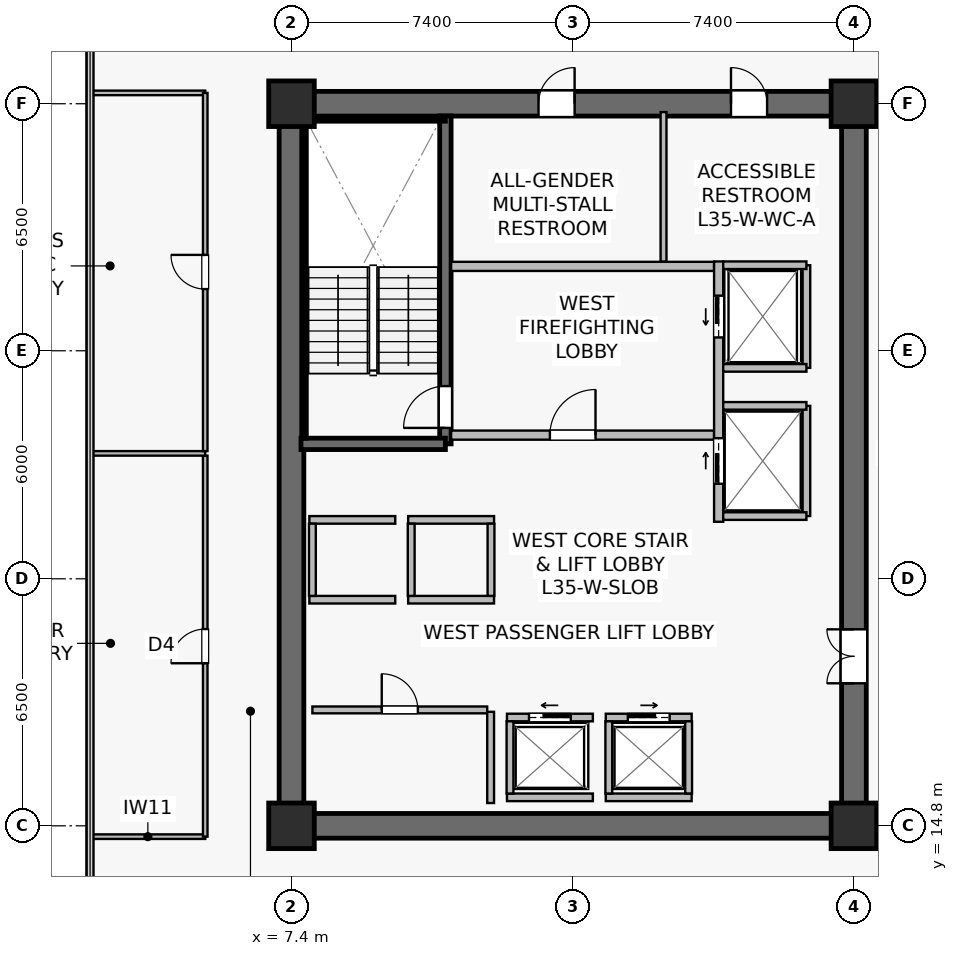
"""IFC4 building model, lengths in metres.
Left out: names, types, materials, properties, quantities, classifications, styles, units other than length and angle.
Written with IfcOpenShell. Run it as: python <this file> out.ifc"""

import sys

from ifc_helpers import new_model, si_unit, direction, frame, frame_2d, origin, origin_2d, place, context, subcontext, project, spatial, rectangle, extrude, source, transform, mapped, element, fill, save


model = new_model("IFC4")
c1 = context("Model", 3, precision=1e-05, world=origin(), true_north=direction((0.0, 1.0)))
c2 = subcontext(c1, "Body", "Model", "MODEL_VIEW")
j1 = project(units=[si_unit("LENGTHUNIT", "METRE"), si_unit("PLANEANGLEUNIT", "RADIAN")], contexts=[c1])
p1 = place(None, origin())
s1 = spatial("IfcSite", under=j1, at=p1, CompositionType="ELEMENT")
p2 = place(p1, origin())
s2 = spatial("IfcBuilding", under=s1, at=p2, CompositionType="ELEMENT")
p3 = place(p2, frame((0.0, 0.0, 146.1)))
s3 = spatial("IfcBuildingStorey", under=s2, at=p3, CompositionType="ELEMENT", Elevation=146.1)
p4 = place(p3, frame((7.075, 14.8, 0.0), z_axis=(0.0, 0.0, 1.0), x_axis=(1.0, 0.0, 0.0)))
e1 = element("IfcWall", 1, at=p4, inside=s3, PredefinedType="SHEAR", context=c2, shape_type="SweptSolid", body=[
    extrude(rectangle(XDim=15.45, YDim=0.65, at=frame_2d((7.725, 0.0))), origin(), (0.0, 0.0, 1.0), 3.79),
])
p5 = place(p3, frame((7.075, 33.8, 0.0), z_axis=(0.0, 0.0, 1.0), x_axis=(1.0, 0.0, 0.0)))
e2 = element("IfcWall", 2, at=p5, inside=s3, PredefinedType="SHEAR", context=c2, shape_type="SweptSolid", body=[
    extrude(rectangle(XDim=15.45, YDim=0.65, at=frame_2d((7.725, 0.0))), origin(), (0.0, 0.0, 1.0), 3.79),
])
p6 = place(p5, frame((6.825, 0.0, 0.0)))
e3 = element("IfcOpeningElement", 3, at=p6, cuts=e2, PredefinedType="OPENING", context=c2, shape_type="SweptSolid", body=[
    extrude(rectangle(XDim=0.95, YDim=2.15, at=frame_2d((0.475, 1.075))), frame((0.0, 0.335, 0.0), z_axis=(0.0, -1.0, 0.0), x_axis=(1.0, 0.0, 0.0)), (0.0, 0.0, 1.0), 0.67),
])
p7 = place(p5, frame((11.89, 0.0, 0.0)))
e4 = element("IfcOpeningElement", 4, at=p7, cuts=e2, PredefinedType="OPENING", context=c2, shape_type="SweptSolid", body=[
    extrude(rectangle(XDim=0.95, YDim=2.15, at=frame_2d((0.475, 1.075))), frame((0.0, 0.335, 0.0), z_axis=(0.0, -1.0, 0.0), x_axis=(1.0, 0.0, 0.0)), (0.0, 0.0, 1.0), 0.67),
])
p8 = place(p3, frame((7.4, 15.125, 0.0), z_axis=(0.0, 0.0, 1.0), x_axis=(0.0, 1.0, 0.0)))
e5 = element("IfcWall", 5, at=p8, inside=s3, PredefinedType="SHEAR", context=c2, shape_type="SweptSolid", body=[
    extrude(rectangle(XDim=18.35, YDim=0.65, at=frame_2d((9.175, 0.0))), origin(), (0.0, 0.0, 1.0), 3.79),
])
p9 = place(p3, frame((22.2, 15.125, 0.0), z_axis=(0.0, 0.0, 1.0), x_axis=(0.0, 1.0, 0.0)))
e6 = element("IfcWall", 6, at=p9, inside=s3, PredefinedType="SHEAR", context=c2, shape_type="SweptSolid", body=[
    extrude(rectangle(XDim=18.35, YDim=0.65, at=frame_2d((9.175, 0.0))), origin(), (0.0, 0.0, 1.0), 3.79),
])
p10 = place(p9, frame((3.425, 0.0, 0.0)))
e7 = element("IfcOpeningElement", 7, at=p10, cuts=e6, PredefinedType="OPENING", context=c2, shape_type="SweptSolid", body=[
    extrude(rectangle(XDim=1.42, YDim=2.2, at=frame_2d((0.71, 1.1))), frame((0.0, 0.335, 0.0), z_axis=(0.0, -1.0, 0.0), x_axis=(1.0, 0.0, 0.0)), (0.0, 0.0, 1.0), 0.67),
])
p11 = place(p3, frame((11.45, 24.85, 0.0), z_axis=(0.0, 0.0, 1.0), x_axis=(0.0, 1.0, 0.0)))
e8 = element("IfcWall", 8, at=p11, inside=s3, PredefinedType="SHEAR", context=c2, shape_type="SweptSolid", body=[
    extrude(rectangle(XDim=8.63, YDim=0.3, at=frame_2d((4.315, 0.0))), origin(), (0.0, 0.0, 1.0), 3.79),
])
p12 = place(p11, frame((0.42, 0.0, 0.0)))
e9 = element("IfcOpeningElement", 9, at=p12, cuts=e8, PredefinedType="OPENING", context=c2, shape_type="SweptSolid", body=[
    extrude(rectangle(XDim=1.1, YDim=2.15, at=frame_2d((0.55, 1.075))), frame((0.0, 0.16, 0.0), z_axis=(0.0, -1.0, 0.0), x_axis=(1.0, 0.0, 0.0)), (0.0, 0.0, 1.0), 0.32),
])
p13 = place(p3, frame((7.65, 24.85, 0.0), z_axis=(0.0, 0.0, 1.0), x_axis=(1.0, 0.0, 0.0)))
e10 = element("IfcWall", 10, at=p13, inside=s3, PredefinedType="SHEAR", context=c2, shape_type="SweptSolid", body=[
    extrude(rectangle(XDim=3.8, YDim=0.3, at=frame_2d((1.9, 0.0))), origin(), (0.0, 0.0, 1.0), 3.79),
])
p14 = place(p3, frame((7.73, 33.4, 0.0), z_axis=(0.0, 0.0, 1.0), x_axis=(1.0, 0.0, 0.0)))
e11 = element("IfcWall", 11, at=p14, inside=s3, PredefinedType="SOLIDWALL", context=c2, shape_type="SweptSolid", body=[
    extrude(rectangle(XDim=3.72, YDim=0.12, at=frame_2d((1.86, 0.0))), origin(), (0.0, 0.0, 1.0), 3.79),
])
p15 = place(p3, frame((7.73, 25.0, 0.0), z_axis=(0.0, 0.0, 1.0), x_axis=(0.0, 1.0, 0.0)))
e12 = element("IfcWall", 12, at=p15, inside=s3, PredefinedType="SOLIDWALL", context=c2, shape_type="SweptSolid", body=[
    extrude(rectangle(XDim=8.32, YDim=0.12, at=frame_2d((4.16, 0.0))), origin(), (0.0, 0.0, 1.0), 3.79),
])
m1 = source(origin(), c2, "Body", "SweptSolid", [
    extrude(rectangle(XDim=1.2, YDim=1.2, at=origin_2d()), origin(), (0.0, 0.0, 1.0), 4.1),
])
for number, where, z_axis, x_axis in (
    (13, (7.4, 14.8, 0.0), (0.0, 0.0, 1.0), (1.0, 0.0, 0.0)),
    (14, (22.2, 14.8, 0.0), (0.0, 0.0, 1.0), (1.0, 0.0, 0.0)),
    (15, (7.4, 33.8, 0.0), (0.0, 0.0, 1.0), (1.0, 0.0, 0.0)),
    (16, (22.2, 33.8, 0.0), (0.0, 0.0, 1.0), (1.0, 0.0, 0.0)),
):
    element("IfcColumn", number, at=place(p3, frame(where, z_axis=z_axis, x_axis=x_axis)), inside=s3, PredefinedType="COLUMN", context=c2, shape_type="MappedRepresentation", body=[
        mapped(m1, transform((0.0, 0.0, 0.0), scale=1.0)),
    ])
p16 = place(p3, frame((11.6, 25.08, 0.0), z_axis=(0.0, 0.0, 1.0), x_axis=(1.0, 0.0, 0.0)))
e17 = element("IfcWall", 17, at=p16, inside=s3, PredefinedType="SOLIDWALL", context=c2, shape_type="SweptSolid", body=[
    extrude(rectangle(XDim=6.92, YDim=0.24, at=frame_2d((3.46, 0.0))), origin(), (0.0, 0.0, 1.0), 3.125),
])
p17 = place(p16, frame((2.6, 0.0, 0.0)))
e18 = element("IfcOpeningElement", 18, at=p17, cuts=e17, PredefinedType="OPENING", context=c2, shape_type="SweptSolid", body=[
    extrude(rectangle(XDim=1.2, YDim=2.16, at=frame_2d((0.6, 1.08))), frame((0.0, 0.13, 0.0), z_axis=(0.0, -1.0, 0.0), x_axis=(1.0, 0.0, 0.0)), (0.0, 0.0, 1.0), 0.26),
])
p18 = place(p3, frame((11.6, 29.52, 0.0), z_axis=(0.0, 0.0, 1.0), x_axis=(1.0, 0.0, 0.0)))
e19 = element("IfcWall", 19, at=p18, inside=s3, PredefinedType="SOLIDWALL", context=c2, shape_type="SweptSolid", body=[
    extrude(rectangle(XDim=6.92, YDim=0.24, at=frame_2d((3.46, 0.0))), origin(), (0.0, 0.0, 1.0), 3.125),
])
p19 = place(p3, frame((18.64, 22.8, 0.0), z_axis=(0.0, 0.0, 1.0), x_axis=(0.0, 1.0, 0.0)))
e20 = element("IfcWall", 20, at=p19, inside=s3, PredefinedType="SOLIDWALL", context=c2, shape_type="SweptSolid", body=[
    extrude(rectangle(XDim=6.85, YDim=0.24, at=frame_2d((3.425, 0.0))), origin(), (0.0, 0.0, 1.0), 2.875),
])
p20 = place(p19, frame((4.85, 0.0, 0.0)))
e21 = element("IfcOpeningElement", 21, at=p20, cuts=e20, PredefinedType="OPENING", context=c2, shape_type="SweptSolid", body=[
    extrude(rectangle(XDim=1.1, YDim=2.22, at=frame_2d((0.55, 1.11))), frame((0.0, 0.13, 0.0), z_axis=(0.0, -1.0, 0.0), x_axis=(1.0, 0.0, 0.0)), (0.0, 0.0, 1.0), 0.26),
])
p21 = place(p19, frame((1.0, 0.0, 0.0)))
e22 = element("IfcOpeningElement", 22, at=p21, cuts=e20, PredefinedType="OPENING", context=c2, shape_type="SweptSolid", body=[
    extrude(rectangle(XDim=1.2, YDim=2.22, at=frame_2d((0.6, 1.11))), frame((0.0, 0.13, 0.0), z_axis=(0.0, -1.0, 0.0), x_axis=(1.0, 0.0, 0.0)), (0.0, 0.0, 1.0), 0.26),
])
p22 = place(p3, frame((13.07, 17.65, 0.0), z_axis=(0.0, 0.0, 1.0), x_axis=(1.0, 0.0, 0.0)))
e23 = element("IfcWall", 23, at=p22, inside=s3, PredefinedType="SOLIDWALL", context=c2, shape_type="SweptSolid", body=[
    extrude(rectangle(XDim=2.26, YDim=0.2, at=frame_2d((1.13, 0.0))), origin(), (0.0, 0.0, 1.0), 3.125),
])
p23 = place(p22, frame((0.58, 0.0, 0.0)))
e24 = element("IfcOpeningElement", 24, at=p23, cuts=e23, PredefinedType="OPENING", context=c2, shape_type="SweptSolid", body=[
    extrude(rectangle(XDim=1.1, YDim=2.22, at=frame_2d((0.55, 1.11))), frame((0.0, 0.11, 0.0), z_axis=(0.0, -1.0, 0.0), x_axis=(1.0, 0.0, 0.0)), (0.0, 0.0, 1.0), 0.22),
])
p24 = place(p3, frame((13.07, 15.55, 0.0), z_axis=(0.0, 0.0, 1.0), x_axis=(1.0, 0.0, 0.0)))
e25 = element("IfcWall", 25, at=p24, inside=s3, PredefinedType="SOLIDWALL", context=c2, shape_type="SweptSolid", body=[
    extrude(rectangle(XDim=2.26, YDim=0.2, at=frame_2d((1.13, 0.0))), origin(), (0.0, 0.0, 1.0), 3.125),
])
p25 = place(p3, frame((13.15, 15.65, 0.0), z_axis=(0.0, 0.0, 1.0), x_axis=(0.0, 1.0, 0.0)))
e26 = element("IfcWall", 26, at=p25, inside=s3, PredefinedType="SOLIDWALL", context=c2, shape_type="SweptSolid", body=[
    extrude(rectangle(XDim=1.9, YDim=0.18, at=frame_2d((0.95, 0.0))), origin(), (0.0, 0.0, 1.0), 3.79),
])
p26 = place(p3, frame((15.67, 17.65, 0.0), z_axis=(0.0, 0.0, 1.0), x_axis=(1.0, 0.0, 0.0)))
e27 = element("IfcWall", 27, at=p26, inside=s3, PredefinedType="SOLIDWALL", context=c2, shape_type="SweptSolid", body=[
    extrude(rectangle(XDim=2.26, YDim=0.2, at=frame_2d((1.13, 0.0))), origin(), (0.0, 0.0, 1.0), 3.79),
])
p27 = place(p26, frame((0.58, 0.0, 0.0)))
e28 = element("IfcOpeningElement", 28, at=p27, cuts=e27, PredefinedType="OPENING", context=c2, shape_type="SweptSolid", body=[
    extrude(rectangle(XDim=1.1, YDim=2.22, at=frame_2d((0.55, 1.11))), frame((0.0, 0.11, 0.0), z_axis=(0.0, -1.0, 0.0), x_axis=(1.0, 0.0, 0.0)), (0.0, 0.0, 1.0), 0.22),
])
p28 = place(p3, frame((15.67, 15.55, 0.0), z_axis=(0.0, 0.0, 1.0), x_axis=(1.0, 0.0, 0.0)))
e29 = element("IfcWall", 29, at=p28, inside=s3, PredefinedType="SOLIDWALL", context=c2, shape_type="SweptSolid", body=[
    extrude(rectangle(XDim=2.26, YDim=0.2, at=frame_2d((1.13, 0.0))), origin(), (0.0, 0.0, 1.0), 3.79),
])
for number, where, z_axis, x_axis in (
    (30, (15.75, 15.65, 0.0), (0.0, 0.0, 1.0), (0.0, 1.0, 0.0)),
    (31, (17.85, 15.65, 0.0), (0.0, 0.0, 1.0), (0.0, 1.0, 0.0)),
):
    element("IfcWall", number, at=place(p3, frame(where, z_axis=z_axis, x_axis=x_axis)), inside=s3, PredefinedType="SOLIDWALL", context=c2, shape_type="SweptSolid", body=[
        extrude(rectangle(XDim=1.9, YDim=0.18, at=frame_2d((0.95, 0.0))), origin(), (0.0, 0.0, 1.0), 3.79),
    ])
for number, where, z_axis, x_axis in (
    (32, (7.87, 20.75, 0.0), (0.0, 0.0, 1.0), (1.0, 0.0, 0.0)),
    (33, (7.87, 22.85, 0.0), (0.0, 0.0, 1.0), (1.0, 0.0, 0.0)),
):
    element("IfcWall", number, at=place(p3, frame(where, z_axis=z_axis, x_axis=x_axis)), inside=s3, PredefinedType="SOLIDWALL", context=c2, shape_type="SweptSolid", body=[
        extrude(rectangle(XDim=2.26, YDim=0.2, at=frame_2d((1.13, 0.0))), origin(), (0.0, 0.0, 1.0), 3.79),
    ])
p29 = place(p3, frame((7.95, 20.85, 0.0), z_axis=(0.0, 0.0, 1.0), x_axis=(0.0, 1.0, 0.0)))
e34 = element("IfcWall", 34, at=p29, inside=s3, PredefinedType="SOLIDWALL", context=c2, shape_type="SweptSolid", body=[
    extrude(rectangle(XDim=1.9, YDim=0.18, at=frame_2d((0.95, 0.0))), origin(), (0.0, 0.0, 1.0), 3.79),
])
for number, where, z_axis, x_axis in (
    (35, (10.47, 20.75, 0.0), (0.0, 0.0, 1.0), (1.0, 0.0, 0.0)),
    (36, (10.47, 22.85, 0.0), (0.0, 0.0, 1.0), (1.0, 0.0, 0.0)),
):
    element("IfcWall", number, at=place(p3, frame(where, z_axis=z_axis, x_axis=x_axis)), inside=s3, PredefinedType="SOLIDWALL", context=c2, shape_type="SweptSolid", body=[
        extrude(rectangle(XDim=2.26, YDim=0.2, at=frame_2d((1.13, 0.0))), origin(), (0.0, 0.0, 1.0), 3.79),
    ])
for number, where, z_axis, x_axis in (
    (37, (10.55, 20.85, 0.0), (0.0, 0.0, 1.0), (0.0, 1.0, 0.0)),
    (38, (12.65, 20.85, 0.0), (0.0, 0.0, 1.0), (0.0, 1.0, 0.0)),
):
    element("IfcWall", number, at=place(p3, frame(where, z_axis=z_axis, x_axis=x_axis)), inside=s3, PredefinedType="SOLIDWALL", context=c2, shape_type="SweptSolid", body=[
        extrude(rectangle(XDim=1.9, YDim=0.18, at=frame_2d((0.95, 0.0))), origin(), (0.0, 0.0, 1.0), 3.79),
    ])
p30 = place(p3, frame((20.95, 26.85, 0.0), z_axis=(0.0, 0.0, 1.0), x_axis=(0.0, 1.0, 0.0)))
e39 = element("IfcWall", 39, at=p30, inside=s3, PredefinedType="SOLIDWALL", context=c2, shape_type="SweptSolid", body=[
    extrude(rectangle(XDim=2.7, YDim=0.2, at=frame_2d((1.35, 0.0))), origin(), (0.0, 0.0, 1.0), 3.79),
])
p31 = place(p3, frame((18.76, 29.55, 0.0), z_axis=(0.0, 0.0, 1.0), x_axis=(1.0, 0.0, 0.0)))
e40 = element("IfcWall", 40, at=p31, inside=s3, PredefinedType="SOLIDWALL", context=c2, shape_type="SweptSolid", body=[
    extrude(rectangle(XDim=2.19, YDim=0.2, at=frame_2d((1.095, 0.0))), origin(), (0.0, 0.0, 1.0), 3.79),
])
p32 = place(p3, frame((18.76, 26.85, 0.0), z_axis=(0.0, 0.0, 1.0), x_axis=(1.0, 0.0, 0.0)))
e41 = element("IfcWall", 41, at=p32, inside=s3, PredefinedType="SOLIDWALL", context=c2, shape_type="SweptSolid", body=[
    extrude(rectangle(XDim=2.19, YDim=0.2, at=frame_2d((1.095, 0.0))), origin(), (0.0, 0.0, 1.0), 3.187),
])
p33 = place(p3, frame((20.95, 22.95, 0.0), z_axis=(0.0, 0.0, 1.0), x_axis=(0.0, 1.0, 0.0)))
e42 = element("IfcWall", 42, at=p33, inside=s3, PredefinedType="SOLIDWALL", context=c2, shape_type="SweptSolid", body=[
    extrude(rectangle(XDim=2.9, YDim=0.2, at=frame_2d((1.45, 0.0))), origin(), (0.0, 0.0, 1.0), 2.875),
])
for number, where, z_axis, x_axis in (
    (43, (18.76, 25.85, 0.0), (0.0, 0.0, 1.0), (1.0, 0.0, 0.0)),
    (44, (18.76, 22.95, 0.0), (0.0, 0.0, 1.0), (1.0, 0.0, 0.0)),
):
    element("IfcWall", number, at=place(p3, frame(where, z_axis=z_axis, x_axis=x_axis)), inside=s3, PredefinedType="SOLIDWALL", context=c2, shape_type="SweptSolid", body=[
        extrude(rectangle(XDim=2.19, YDim=0.2, at=frame_2d((1.095, 0.0))), origin(), (0.0, 0.0, 1.0), 3.79),
    ])
p34 = place(p3, frame((7.95, 17.85, 0.0), z_axis=(0.0, 0.0, 1.0), x_axis=(1.0, 0.0, 0.0)))
e45 = element("IfcWall", 45, at=p34, inside=s3, PredefinedType="SOLIDWALL", context=c2, shape_type="SweptSolid", body=[
    extrude(rectangle(XDim=4.6, YDim=0.18, at=frame_2d((2.3, 0.0))), origin(), (0.0, 0.0, 1.0), 3.79),
])
p35 = place(p34, frame((1.825, 0.0, 0.0)))
e46 = element("IfcOpeningElement", 46, at=p35, cuts=e45, PredefinedType="OPENING", context=c2, shape_type="SweptSolid", body=[
    extrude(rectangle(XDim=0.95, YDim=2.15, at=frame_2d((0.475, 1.075))), frame((0.0, 0.1, 0.0), z_axis=(0.0, -1.0, 0.0), x_axis=(1.0, 0.0, 0.0)), (0.0, 0.0, 1.0), 0.2),
])
p36 = place(p3, frame((12.64, 15.4, 0.0), z_axis=(0.0, 0.0, 1.0), x_axis=(0.0, 1.0, 0.0)))
e47 = element("IfcWall", 47, at=p36, inside=s3, PredefinedType="SOLIDWALL", context=c2, shape_type="SweptSolid", body=[
    extrude(rectangle(XDim=2.4, YDim=0.18, at=frame_2d((1.2, 0.0))), origin(), (0.0, 0.0, 1.0), 3.79),
])
p37 = place(p3, frame((17.19, 29.65, 0.0), z_axis=(0.0, 0.0, 1.0), x_axis=(0.0, 1.0, 0.0)))
e48 = element("IfcWall", 48, at=p37, inside=s3, PredefinedType="PLUMBINGWALL", context=c2, shape_type="SweptSolid", body=[
    extrude(rectangle(XDim=3.93, YDim=0.155, at=frame_2d((1.965, 0.0))), origin(), (0.0, 0.0, 1.0), 3.79),
])
for number, where, z_axis, x_axis in (
    (49, (2.11, 14.515, 0.0), (0.0, 0.0, 1.0), (1.0, 0.0, 0.0)),
    (50, (2.11, 34.085, 0.0), (0.0, 0.0, 1.0), (1.0, 0.0, 0.0)),
):
    element("IfcWall", number, at=place(p3, frame(where, z_axis=z_axis, x_axis=x_axis)), inside=s3, PredefinedType="PARTITIONING", context=c2, shape_type="SweptSolid", body=[
        extrude(rectangle(XDim=3.02, YDim=0.12, at=frame_2d((1.51, 0.0))), origin(), (0.0, 0.0, 1.0), 3.79),
    ])
p38 = place(p3, frame((5.13, 14.515, 0.0), z_axis=(0.0, 0.0, 1.0), x_axis=(0.0, 1.0, 0.0)))
e51 = element("IfcWall", 51, at=p38, inside=s3, PredefinedType="PARTITIONING", context=c2, shape_type="SweptSolid", body=[
    extrude(rectangle(XDim=10.025, YDim=0.12, at=frame_2d((5.013, 0.0))), origin(), (0.0, 0.0, 1.0), 3.79),
])
p39 = place(p38, frame((4.562, 0.0, 0.0)))
e52 = element("IfcOpeningElement", 52, at=p39, cuts=e51, PredefinedType="OPENING", context=c2, shape_type="SweptSolid", body=[
    extrude(rectangle(XDim=0.9, YDim=2.1, at=frame_2d((0.45, 1.05))), frame((0.0, 0.07, 0.0), z_axis=(0.0, -1.0, 0.0), x_axis=(1.0, 0.0, 0.0)), (0.0, 0.0, 1.0), 0.14),
])
p40 = place(p3, frame((2.11, 24.6, 0.0), z_axis=(0.0, 0.0, 1.0), x_axis=(1.0, 0.0, 0.0)))
e53 = element("IfcWall", 53, at=p40, inside=s3, PredefinedType="PARTITIONING", context=c2, shape_type="SweptSolid", body=[
    extrude(rectangle(XDim=3.02, YDim=0.12, at=frame_2d((1.51, 0.0))), origin(), (0.0, 0.0, 1.0), 3.79),
])
p41 = place(p3, frame((5.13, 24.66, 0.0), z_axis=(0.0, 0.0, 1.0), x_axis=(0.0, 1.0, 0.0)))
e54 = element("IfcWall", 54, at=p41, inside=s3, PredefinedType="PARTITIONING", context=c2, shape_type="SweptSolid", body=[
    extrude(rectangle(XDim=9.425, YDim=0.12, at=frame_2d((4.712, 0.0))), origin(), (0.0, 0.0, 1.0), 3.79),
])
p42 = place(p41, frame((4.262, 0.0, 0.0)))
e55 = element("IfcOpeningElement", 55, at=p42, cuts=e54, PredefinedType="OPENING", context=c2, shape_type="SweptSolid", body=[
    extrude(rectangle(XDim=0.9, YDim=2.1, at=frame_2d((0.45, 1.05))), frame((0.0, 0.07, 0.0), z_axis=(0.0, -1.0, 0.0), x_axis=(1.0, 0.0, 0.0)), (0.0, 0.0, 1.0), 0.14),
])
m2 = source(origin(), c2, "Body", "SweptSolid", [
    extrude(rectangle(XDim=1.1, YDim=2.15, at=frame_2d((0.55, 1.075))), frame((0.0, 0.025, 0.0), z_axis=(0.0, -1.0, 0.0), x_axis=(1.0, 0.0, 0.0)), (0.0, 0.0, 1.0), 0.05),
])
p43 = place(p12, origin())
e56 = element("IfcDoor", 56, at=p43, inside=s3, OperationType="SINGLE_SWING_LEFT", PredefinedType="DOOR", context=c2, shape_type="MappedRepresentation", body=[
    mapped(m2, transform((0.0, 0.0, 0.0), scale=1.0)),
])
fill(e9, e56)
m3 = source(origin(), c2, "Body", "SweptSolid", [
    extrude(rectangle(XDim=1.2, YDim=2.16, at=frame_2d((0.6, 1.08))), frame((0.0, 0.025, 0.0), z_axis=(0.0, -1.0, 0.0), x_axis=(1.0, 0.0, 0.0)), (0.0, 0.0, 1.0), 0.05),
])
p44 = place(p17, origin())
e57 = element("IfcDoor", 57, at=p44, inside=s3, OperationType="SINGLE_SWING_RIGHT", PredefinedType="DOOR", context=c2, shape_type="MappedRepresentation", body=[
    mapped(m3, transform((0.0, 0.0, 0.0), scale=1.0)),
])
fill(e18, e57)
m4 = source(origin(), c2, "Body", "SweptSolid", [
    extrude(rectangle(XDim=1.1, YDim=2.22, at=frame_2d((0.55, 1.11))), frame((0.0, 0.025, 0.0), z_axis=(0.0, -1.0, 0.0), x_axis=(1.0, 0.0, 0.0)), (0.0, 0.0, 1.0), 0.05),
])
p45 = place(p23, origin())
e58 = element("IfcDoor", 58, at=p45, inside=s3, OperationType="SLIDING_TO_LEFT", PredefinedType="USERDEFINED", context=c2, shape_type="MappedRepresentation", body=[
    mapped(m4, transform((0.0, 0.0, 0.0), scale=1.0)),
])
fill(e24, e58)
p46 = place(p27, origin())
e59 = element("IfcDoor", 59, at=p46, inside=s3, OperationType="SLIDING_TO_RIGHT", PredefinedType="USERDEFINED", context=c2, shape_type="MappedRepresentation", body=[
    mapped(m4, transform((0.0, 0.0, 0.0), scale=1.0)),
])
fill(e28, e59)
p47 = place(p20, origin())
e60 = element("IfcDoor", 60, at=p47, inside=s3, OperationType="SLIDING_TO_LEFT", PredefinedType="USERDEFINED", context=c2, shape_type="MappedRepresentation", body=[
    mapped(m4, transform((0.0, 0.0, 0.0), scale=1.0)),
])
fill(e21, e60)
m5 = source(origin(), c2, "Body", "SweptSolid", [
    extrude(rectangle(XDim=1.2, YDim=2.22, at=frame_2d((0.6, 1.11))), frame((0.0, 0.025, 0.0), z_axis=(0.0, -1.0, 0.0), x_axis=(1.0, 0.0, 0.0)), (0.0, 0.0, 1.0), 0.05),
])
p48 = place(p21, origin())
e61 = element("IfcDoor", 61, at=p48, inside=s3, OperationType="SLIDING_TO_RIGHT", PredefinedType="USERDEFINED", context=c2, shape_type="MappedRepresentation", body=[
    mapped(m5, transform((0.0, 0.0, 0.0), scale=1.0)),
])
fill(e22, e61)
m6 = source(origin(), c2, "Body", "SweptSolid", [
    extrude(rectangle(XDim=0.95, YDim=2.15, at=frame_2d((0.475, 1.075))), frame((0.0, 0.025, 0.0), z_axis=(0.0, -1.0, 0.0), x_axis=(1.0, 0.0, 0.0)), (0.0, 0.0, 1.0), 0.05),
])
p49 = place(p35, origin())
e62 = element("IfcDoor", 62, at=p49, inside=s3, OperationType="SINGLE_SWING_LEFT", PredefinedType="DOOR", context=c2, shape_type="MappedRepresentation", body=[
    mapped(m6, transform((0.0, 0.0, 0.0), scale=1.0)),
])
fill(e46, e62)
m7 = source(origin(), c2, "Body", "SweptSolid", [
    extrude(rectangle(XDim=1.42, YDim=2.2, at=frame_2d((0.71, 1.1))), frame((0.0, 0.025, 0.0), z_axis=(0.0, -1.0, 0.0), x_axis=(1.0, 0.0, 0.0)), (0.0, 0.0, 1.0), 0.05),
])
p50 = place(p10, origin())
e63 = element("IfcDoor", 63, at=p50, inside=s3, OperationType="DOUBLE_DOOR_SINGLE_SWING", PredefinedType="DOOR", context=c2, shape_type="MappedRepresentation", body=[
    mapped(m7, transform((0.0, 0.0, 0.0), scale=1.0)),
])
fill(e7, e63)
p51 = place(p6, origin())
e64 = element("IfcDoor", 64, at=p51, inside=s3, OperationType="SINGLE_SWING_RIGHT", PredefinedType="DOOR", context=c2, shape_type="MappedRepresentation", body=[
    mapped(m6, transform((0.0, 0.0, 0.0), scale=1.0)),
])
fill(e3, e64)
p52 = place(p7, origin())
e65 = element("IfcDoor", 65, at=p52, inside=s3, OperationType="SINGLE_SWING_LEFT", PredefinedType="DOOR", context=c2, shape_type="MappedRepresentation", body=[
    mapped(m6, transform((0.0, 0.0, 0.0), scale=1.0)),
])
fill(e4, e65)
m8 = source(origin(), c2, "Body", "SweptSolid", [
    extrude(rectangle(XDim=0.9, YDim=2.1, at=frame_2d((0.45, 1.05))), frame((0.0, 0.025, 0.0), z_axis=(0.0, -1.0, 0.0), x_axis=(1.0, 0.0, 0.0)), (0.0, 0.0, 1.0), 0.05),
])
p53 = place(p39, origin())
e66 = element("IfcDoor", 66, at=p53, inside=s3, OperationType="SINGLE_SWING_LEFT", PredefinedType="DOOR", context=c2, shape_type="MappedRepresentation", body=[
    mapped(m8, transform((0.0, 0.0, 0.0), scale=1.0)),
])
fill(e52, e66)
p54 = place(p42, origin())
e67 = element("IfcDoor", 67, at=p54, inside=s3, OperationType="SINGLE_SWING_RIGHT", PredefinedType="DOOR", context=c2, shape_type="MappedRepresentation", body=[
    mapped(m8, transform((0.0, 0.0, 0.0), scale=1.0)),
])
fill(e55, e67)
save(model, sys.argv[1])
